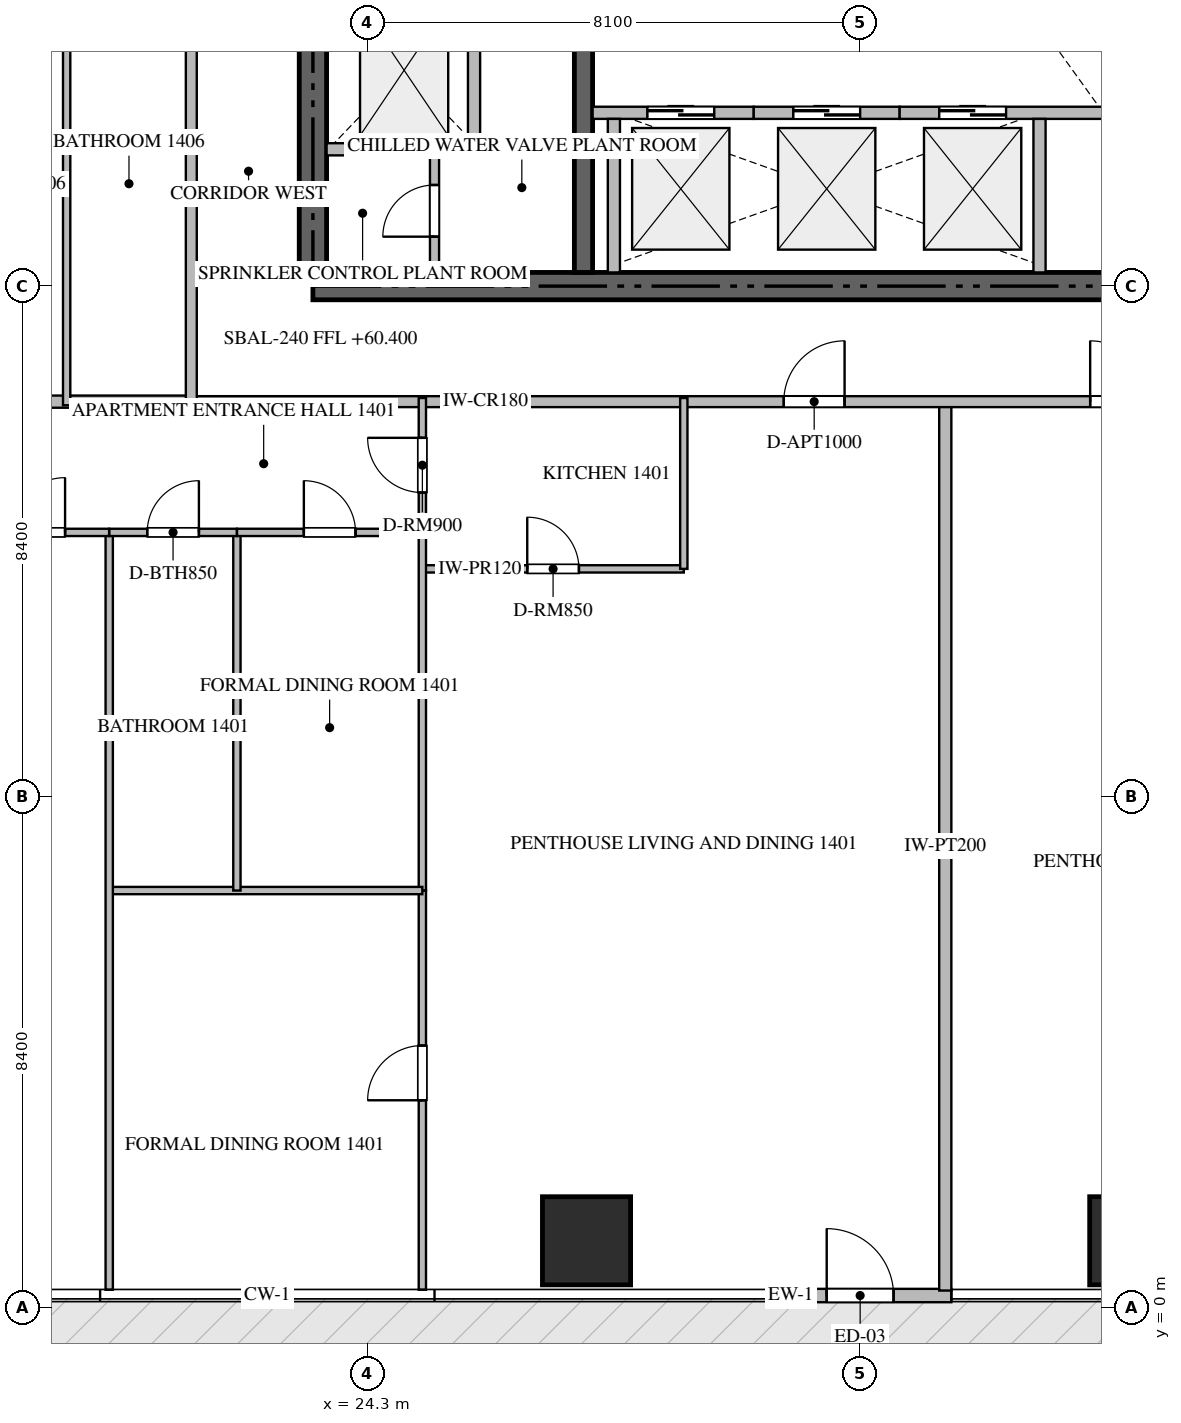
"""IFC4 building model, lengths in metres.
Left out: names, types, materials, properties, quantities, classifications, styles, units other than length and angle.
Written with IfcOpenShell. Run it as: python <this file> out.ifc"""

import sys

from ifc_helpers import new_model, si_unit, direction, frame, frame_2d, origin, origin_2d, place, context, subcontext, project, spatial, rectangle, extrude, source, transform, mapped, element, fill, save


model = new_model("IFC4")
c1 = context("Model", 3, precision=1e-05, world=origin(), true_north=direction((0.0, 1.0)))
c2 = subcontext(c1, "Body", "Model", "MODEL_VIEW")
j1 = project(units=[si_unit("LENGTHUNIT", "METRE"), si_unit("PLANEANGLEUNIT", "RADIAN")], contexts=[c1])
p1 = place(None, origin())
s1 = spatial("IfcSite", under=j1, at=p1, CompositionType="ELEMENT")
p2 = place(p1, origin())
s2 = spatial("IfcBuilding", under=s1, at=p2, CompositionType="ELEMENT")
p3 = place(p2, frame((0.0, 0.0, 60.45)))
s3 = spatial("IfcBuildingStorey", under=s2, at=p3, CompositionType="ELEMENT", Elevation=60.45)
p4 = place(p3, frame((23.4, 16.8, -0.26), z_axis=(0.0, 0.0, 1.0), x_axis=(1.0, 0.0, 0.0)))
e1 = element("IfcWall", 1, at=p4, inside=s3, PredefinedType="SHEAR", context=c2, shape_type="SweptSolid", body=[
    extrude(rectangle(XDim=18.0, YDim=0.45, at=frame_2d((9.0, 0.0))), origin(), (0.0, 0.0, 1.0), 3.748),
])
p5 = place(p3, frame((23.4, 17.025, -0.26), z_axis=(0.0, 0.0, 1.0), x_axis=(0.0, 1.0, 0.0)))
e2 = element("IfcWall", 2, at=p5, inside=s3, PredefinedType="SHEAR", context=c2, shape_type="SweptSolid", body=[
    extrude(rectangle(XDim=4.825, YDim=0.45, at=frame_2d((2.413, 0.0))), origin(), (0.0, 0.0, 1.0), 3.748),
])
p6 = place(p3, frame((27.85, 17.025, -0.26), z_axis=(0.0, 0.0, 1.0), x_axis=(0.0, 1.0, 0.0)))
e3 = element("IfcWall", 3, at=p6, inside=s3, PredefinedType="SHEAR", context=c2, shape_type="SweptSolid", body=[
    extrude(rectangle(XDim=4.825, YDim=0.3, at=frame_2d((2.413, 0.0))), origin(), (0.0, 0.0, 1.0), 3.748),
])
m1 = source(origin(), c2, "Body", "SweptSolid", [
    extrude(rectangle(XDim=1.45, YDim=1.45, at=origin_2d()), origin(), (0.0, 0.0, 1.0), 3.75),
])
for number, where, z_axis, x_axis in (
    (4, (27.9, 1.1, -0.26), (0.0, 0.0, 1.0), (1.0, 0.0, 0.0)),
    (5, (36.9, 1.1, -0.26), (0.0, 0.0, 1.0), (1.0, 0.0, 0.0)),
):
    element("IfcColumn", number, at=place(p3, frame(where, z_axis=z_axis, x_axis=x_axis)), inside=s3, PredefinedType="COLUMN", context=c2, shape_type="MappedRepresentation", body=[
        mapped(m1, transform((0.0, 0.0, 0.0), scale=1.0)),
    ])
p7 = place(p3, frame((30.9, 0.2, 0.0), z_axis=(0.0, 0.0, 1.0), x_axis=(1.0, 0.0, 0.0)))
e6 = element("IfcWall", 6, at=p7, inside=s3, PredefinedType="ELEMENTEDWALL", context=c2, shape_type="SweptSolid", body=[
    extrude(rectangle(XDim=3.0, YDim=0.22, at=frame_2d((1.5, 0.0))), origin(), (0.0, 0.0, 1.0), 3.475),
])
p8 = place(p7, frame((0.95, 0.0, 0.0)))
e7 = element("IfcOpeningElement", 7, at=p8, cuts=e6, PredefinedType="OPENING", context=c2, shape_type="SweptSolid", body=[
    extrude(rectangle(XDim=1.1, YDim=2.2, at=frame_2d((0.55, 1.1))), frame((0.0, 0.12, 0.0), z_axis=(0.0, -1.0, 0.0), x_axis=(1.0, 0.0, 0.0)), (0.0, 0.0, 1.0), 0.24),
])
p9 = place(p3, frame((28.0, 19.65, 0.0), z_axis=(0.0, 0.0, 1.0), x_axis=(1.0, 0.0, 0.0)))
e8 = element("IfcWall", 8, at=p9, inside=s3, PredefinedType="STANDARD", context=c2, shape_type="SweptSolid", body=[
    extrude(rectangle(XDim=2.65, YDim=0.2, at=frame_2d((1.325, 0.0))), origin(), (0.0, 0.0, 1.0), 3.49),
])
p10 = place(p9, frame((0.9, 0.0, 0.0)))
e9 = element("IfcOpeningElement", 9, at=p10, cuts=e8, PredefinedType="OPENING", context=c2, shape_type="SweptSolid", body=[
    extrude(rectangle(XDim=1.1, YDim=2.2, at=frame_2d((0.55, 1.1))), frame((0.0, 0.11, 0.0), z_axis=(0.0, -1.0, 0.0), x_axis=(1.0, 0.0, 0.0)), (0.0, 0.0, 1.0), 0.22),
])
p11 = place(p3, frame((28.35, 17.025, 0.0), z_axis=(0.0, 0.0, 1.0), x_axis=(0.0, 1.0, 0.0)))
e10 = element("IfcWall", 10, at=p11, inside=s3, PredefinedType="STANDARD", context=c2, shape_type="SweptSolid", body=[
    extrude(rectangle(XDim=2.525, YDim=0.2, at=frame_2d((1.263, 0.0))), origin(), (0.0, 0.0, 1.0), 3.49),
])
p12 = place(p3, frame((30.65, 19.65, 0.0), z_axis=(0.0, 0.0, 1.0), x_axis=(1.0, 0.0, 0.0)))
e11 = element("IfcWall", 11, at=p12, inside=s3, PredefinedType="STANDARD", context=c2, shape_type="SweptSolid", body=[
    extrude(rectangle(XDim=2.4, YDim=0.2, at=frame_2d((1.2, 0.0))), origin(), (0.0, 0.0, 1.0), 3.49),
])
p13 = place(p12, frame((0.65, 0.0, 0.0)))
e12 = element("IfcOpeningElement", 12, at=p13, cuts=e11, PredefinedType="OPENING", context=c2, shape_type="SweptSolid", body=[
    extrude(rectangle(XDim=1.1, YDim=2.2, at=frame_2d((0.55, 1.1))), frame((0.0, 0.11, 0.0), z_axis=(0.0, -1.0, 0.0), x_axis=(1.0, 0.0, 0.0)), (0.0, 0.0, 1.0), 0.22),
])
p14 = place(p3, frame((33.05, 19.65, 0.0), z_axis=(0.0, 0.0, 1.0), x_axis=(1.0, 0.0, 0.0)))
e13 = element("IfcWall", 13, at=p14, inside=s3, PredefinedType="STANDARD", context=c2, shape_type="SweptSolid", body=[
    extrude(rectangle(XDim=3.75, YDim=0.2, at=frame_2d((1.875, 0.0))), origin(), (0.0, 0.0, 1.0), 3.49),
])
p15 = place(p14, frame((0.65, 0.0, 0.0)))
e14 = element("IfcOpeningElement", 14, at=p15, cuts=e13, PredefinedType="OPENING", context=c2, shape_type="SweptSolid", body=[
    extrude(rectangle(XDim=1.1, YDim=2.2, at=frame_2d((0.55, 1.1))), frame((0.0, 0.11, 0.0), z_axis=(0.0, -1.0, 0.0), x_axis=(1.0, 0.0, 0.0)), (0.0, 0.0, 1.0), 0.22),
])
p16 = place(p3, frame((35.35, 17.025, 0.0), z_axis=(0.0, 0.0, 1.0), x_axis=(0.0, 1.0, 0.0)))
e15 = element("IfcWall", 15, at=p16, inside=s3, PredefinedType="STANDARD", context=c2, shape_type="SweptSolid", body=[
    extrude(rectangle(XDim=2.525, YDim=0.2, at=frame_2d((1.263, 0.0))), origin(), (0.0, 0.0, 1.0), 3.49),
])
p17 = place(p3, frame((26.05, 19.05, 0.0), z_axis=(0.0, 0.0, 1.0), x_axis=(0.0, 1.0, 0.0)))
e16 = element("IfcWall", 16, at=p17, inside=s3, PredefinedType="STANDARD", context=c2, shape_type="SweptSolid", body=[
    extrude(rectangle(XDim=2.5, YDim=0.2, at=frame_2d((1.25, 0.0))), origin(), (0.0, 0.0, 1.0), 3.49),
])
p18 = place(p3, frame((23.625, 19.05, 0.0), z_axis=(0.0, 0.0, 1.0), x_axis=(1.0, 0.0, 0.0)))
e17 = element("IfcWall", 17, at=p18, inside=s3, PredefinedType="STANDARD", context=c2, shape_type="SweptSolid", body=[
    extrude(rectangle(XDim=2.425, YDim=0.2, at=frame_2d((1.212, 0.0))), origin(), (0.0, 0.0, 1.0), 3.49),
])
p19 = place(p3, frame((25.4, 17.025, 0.0), z_axis=(0.0, 0.0, 1.0), x_axis=(0.0, 1.0, 0.0)))
e18 = element("IfcWall", 18, at=p19, inside=s3, PredefinedType="PARTITIONING", context=c2, shape_type="SweptSolid", body=[
    extrude(rectangle(XDim=2.025, YDim=0.15, at=frame_2d((1.013, 0.0))), origin(), (0.0, 0.0, 1.0), 3.49),
])
p20 = place(p19, frame((0.588, 0.0, 0.0)))
e19 = element("IfcOpeningElement", 19, at=p20, cuts=e18, PredefinedType="OPENING", context=c2, shape_type="SweptSolid", body=[
    extrude(rectangle(XDim=0.85, YDim=2.1, at=frame_2d((0.425, 1.05))), frame((0.0, 0.085, 0.0), z_axis=(0.0, -1.0, 0.0), x_axis=(1.0, 0.0, 0.0)), (0.0, 0.0, 1.0), 0.17),
])
p21 = place(p3, frame((33.8, 0.282, 0.0), z_axis=(0.0, 0.0, 1.0), x_axis=(0.0, 1.0, 0.0)))
e20 = element("IfcWall", 20, at=p21, inside=s3, PredefinedType="PARTITIONING", context=c2, shape_type="SweptSolid", body=[
    extrude(rectangle(XDim=14.618, YDim=0.2, at=frame_2d((7.309, 0.0))), origin(), (0.0, 0.0, 1.0), 3.49),
])
p22 = place(p3, frame((6.082, 14.9, 0.0), z_axis=(0.0, 0.0, 1.0), x_axis=(1.0, 0.0, 0.0)))
e21 = element("IfcWall", 21, at=p22, inside=s3, PredefinedType="PARTITIONING", context=c2, shape_type="SweptSolid", body=[
    extrude(rectangle(XDim=15.318, YDim=0.2, at=frame_2d((7.659, 0.0))), origin(), (0.0, 0.0, 1.0), 3.49),
])
p23 = place(p3, frame((21.402, 14.9, 0.0), z_axis=(0.0, 0.0, 1.0), x_axis=(1.0, 0.0, 0.0)))
e22 = element("IfcWall", 22, at=p23, inside=s3, PredefinedType="PARTITIONING", context=c2, shape_type="SweptSolid", body=[
    extrude(rectangle(XDim=21.996, YDim=0.18, at=frame_2d((10.998, 0.0))), origin(), (0.0, 0.0, 1.0), 3.49),
])
p24 = place(p23, frame((9.742, 0.0, 0.0)))
e23 = element("IfcOpeningElement", 23, at=p24, cuts=e22, PredefinedType="OPENING", context=c2, shape_type="SweptSolid", body=[
    extrude(rectangle(XDim=1.0, YDim=2.15, at=frame_2d((0.5, 1.075))), frame((0.0, 0.1, 0.0), z_axis=(0.0, -1.0, 0.0), x_axis=(1.0, 0.0, 0.0)), (0.0, 0.0, 1.0), 0.2),
])
p25 = place(p23, frame((14.781, 0.0, 0.0)))
e24 = element("IfcOpeningElement", 24, at=p25, cuts=e22, PredefinedType="OPENING", context=c2, shape_type="SweptSolid", body=[
    extrude(rectangle(XDim=1.0, YDim=2.15, at=frame_2d((0.5, 1.075))), frame((0.0, 0.1, 0.0), z_axis=(0.0, -1.0, 0.0), x_axis=(1.0, 0.0, 0.0)), (0.0, 0.0, 1.0), 0.2),
])
p26 = place(p3, frame((21.4, 14.9, 0.0), z_axis=(0.0, 0.0, 1.0), x_axis=(0.0, 1.0, 0.0)))
e25 = element("IfcWall", 25, at=p26, inside=s3, PredefinedType="PARTITIONING", context=c2, shape_type="SweptSolid", body=[
    extrude(rectangle(XDim=20.6, YDim=0.18, at=frame_2d((10.3, 0.0))), origin(), (0.0, 0.0, 1.0), 3.49),
])
p27 = place(p26, frame((8.996, 0.0, 0.0)))
e26 = element("IfcOpeningElement", 26, at=p27, cuts=e25, PredefinedType="OPENING", context=c2, shape_type="SweptSolid", body=[
    extrude(rectangle(XDim=1.0, YDim=2.15, at=frame_2d((0.5, 1.075))), frame((0.0, 0.1, 0.0), z_axis=(0.0, -1.0, 0.0), x_axis=(1.0, 0.0, 0.0)), (0.0, 0.0, 1.0), 0.2),
])
p28 = place(p26, frame((13.191, 0.0, 0.0)))
e27 = element("IfcOpeningElement", 27, at=p28, cuts=e25, PredefinedType="OPENING", context=c2, shape_type="SweptSolid", body=[
    extrude(rectangle(XDim=1.0, YDim=2.15, at=frame_2d((0.5, 1.075))), frame((0.0, 0.1, 0.0), z_axis=(0.0, -1.0, 0.0), x_axis=(1.0, 0.0, 0.0)), (0.0, 0.0, 1.0), 0.2),
])
p29 = place(p3, frame((25.2, 12.15, 0.0), z_axis=(0.0, 0.0, 1.0), x_axis=(1.0, 0.0, 0.0)))
e28 = element("IfcWall", 28, at=p29, inside=s3, PredefinedType="PARTITIONING", context=c2, shape_type="SweptSolid", body=[
    extrude(rectangle(XDim=4.3, YDim=0.12, at=frame_2d((2.15, 0.0))), origin(), (0.0, 0.0, 1.0), 3.49),
])
p30 = place(p29, frame((1.725, 0.0, 0.0)))
e29 = element("IfcOpeningElement", 29, at=p30, cuts=e28, PredefinedType="OPENING", context=c2, shape_type="SweptSolid", body=[
    extrude(rectangle(XDim=0.85, YDim=2.1, at=frame_2d((0.425, 1.05))), frame((0.0, 0.07, 0.0), z_axis=(0.0, -1.0, 0.0), x_axis=(1.0, 0.0, 0.0)), (0.0, 0.0, 1.0), 0.14),
])
p31 = place(p3, frame((29.5, 12.15, 0.0), z_axis=(0.0, 0.0, 1.0), x_axis=(0.0, 1.0, 0.0)))
e30 = element("IfcWall", 30, at=p31, inside=s3, PredefinedType="PARTITIONING", context=c2, shape_type="SweptSolid", body=[
    extrude(rectangle(XDim=2.81, YDim=0.12, at=frame_2d((1.405, 0.0))), origin(), (0.0, 0.0, 1.0), 3.49),
])
p32 = place(p3, frame((25.2, 12.75, 0.0), z_axis=(0.0, 0.0, 1.0), x_axis=(0.0, 1.0, 0.0)))
e31 = element("IfcWall", 31, at=p32, inside=s3, PredefinedType="PARTITIONING", context=c2, shape_type="SweptSolid", body=[
    extrude(rectangle(XDim=2.21, YDim=0.12, at=frame_2d((1.105, 0.0))), origin(), (0.0, 0.0, 1.0), 3.49),
])
p33 = place(p32, frame((0.655, 0.0, 0.0)))
e32 = element("IfcOpeningElement", 32, at=p33, cuts=e31, PredefinedType="OPENING", context=c2, shape_type="SweptSolid", body=[
    extrude(rectangle(XDim=0.9, YDim=2.1, at=frame_2d((0.45, 1.05))), frame((0.0, 0.07, 0.0), z_axis=(0.0, -1.0, 0.0), x_axis=(1.0, 0.0, 0.0)), (0.0, 0.0, 1.0), 0.14),
])
p34 = place(p3, frame((25.2, 0.295, 0.0), z_axis=(0.0, 0.0, 1.0), x_axis=(0.0, 1.0, 0.0)))
e33 = element("IfcWall", 33, at=p34, inside=s3, PredefinedType="PARTITIONING", context=c2, shape_type="SweptSolid", body=[
    extrude(rectangle(XDim=6.565, YDim=0.12, at=frame_2d((3.283, 0.0))), origin(), (0.0, 0.0, 1.0), 3.49),
])
p35 = place(p34, frame((3.116, 0.0, 0.0)))
e34 = element("IfcOpeningElement", 34, at=p35, cuts=e33, PredefinedType="OPENING", context=c2, shape_type="SweptSolid", body=[
    extrude(rectangle(XDim=0.9, YDim=2.1, at=frame_2d((0.45, 1.05))), frame((0.0, 0.07, 0.0), z_axis=(0.0, -1.0, 0.0), x_axis=(1.0, 0.0, 0.0)), (0.0, 0.0, 1.0), 0.14),
])
p36 = place(p3, frame((25.2, 6.862, 0.0), z_axis=(0.0, 0.0, 1.0), x_axis=(0.0, 1.0, 0.0)))
e35 = element("IfcWall", 35, at=p36, inside=s3, PredefinedType="PARTITIONING", context=c2, shape_type="SweptSolid", body=[
    extrude(rectangle(XDim=5.886, YDim=0.12, at=frame_2d((2.943, 0.0))), origin(), (0.0, 0.0, 1.0), 3.49),
])
p37 = place(p3, frame((20.05, 6.86, 0.0), z_axis=(0.0, 0.0, 1.0), x_axis=(1.0, 0.0, 0.0)))
e36 = element("IfcWall", 36, at=p37, inside=s3, PredefinedType="PARTITIONING", context=c2, shape_type="SweptSolid", body=[
    extrude(rectangle(XDim=5.15, YDim=0.12, at=frame_2d((2.575, 0.0))), origin(), (0.0, 0.0, 1.0), 3.49),
])
p38 = place(p3, frame((20.05, 0.295, 0.0), z_axis=(0.0, 0.0, 1.0), x_axis=(0.0, 1.0, 0.0)))
e37 = element("IfcWall", 37, at=p38, inside=s3, PredefinedType="PARTITIONING", context=c2, shape_type="SweptSolid", body=[
    extrude(rectangle(XDim=12.455, YDim=0.12, at=frame_2d((6.228, 0.0))), origin(), (0.0, 0.0, 1.0), 3.49),
])
p39 = place(p3, frame((22.15, 6.86, 0.0), z_axis=(0.0, 0.0, 1.0), x_axis=(0.0, 1.0, 0.0)))
e38 = element("IfcWall", 38, at=p39, inside=s3, PredefinedType="PARTITIONING", context=c2, shape_type="SweptSolid", body=[
    extrude(rectangle(XDim=5.89, YDim=0.12, at=frame_2d((2.945, 0.0))), origin(), (0.0, 0.0, 1.0), 3.49),
])
p40 = place(p3, frame((20.05, 12.75, 0.0), z_axis=(0.0, 0.0, 1.0), x_axis=(1.0, 0.0, 0.0)))
e39 = element("IfcWall", 39, at=p40, inside=s3, PredefinedType="PARTITIONING", context=c2, shape_type="SweptSolid", body=[
    extrude(rectangle(XDim=2.1, YDim=0.12, at=frame_2d((1.05, 0.0))), origin(), (0.0, 0.0, 1.0), 3.49),
])
p41 = place(p40, frame((0.625, 0.0, 0.0)))
e40 = element("IfcOpeningElement", 40, at=p41, cuts=e39, PredefinedType="OPENING", context=c2, shape_type="SweptSolid", body=[
    extrude(rectangle(XDim=0.85, YDim=2.1, at=frame_2d((0.425, 1.05))), frame((0.0, 0.07, 0.0), z_axis=(0.0, -1.0, 0.0), x_axis=(1.0, 0.0, 0.0)), (0.0, 0.0, 1.0), 0.14),
])
p42 = place(p3, frame((22.152, 12.75, 0.0), z_axis=(0.0, 0.0, 1.0), x_axis=(1.0, 0.0, 0.0)))
e41 = element("IfcWall", 41, at=p42, inside=s3, PredefinedType="PARTITIONING", context=c2, shape_type="SweptSolid", body=[
    extrude(rectangle(XDim=3.048, YDim=0.12, at=frame_2d((1.524, 0.0))), origin(), (0.0, 0.0, 1.0), 3.49),
])
p43 = place(p42, frame((1.099, 0.0, 0.0)))
e42 = element("IfcOpeningElement", 42, at=p43, cuts=e41, PredefinedType="OPENING", context=c2, shape_type="SweptSolid", body=[
    extrude(rectangle(XDim=0.85, YDim=2.1, at=frame_2d((0.425, 1.05))), frame((0.0, 0.07, 0.0), z_axis=(0.0, -1.0, 0.0), x_axis=(1.0, 0.0, 0.0)), (0.0, 0.0, 1.0), 0.14),
])
p44 = place(p3, frame((17.7, 12.75, 0.0), z_axis=(0.0, 0.0, 1.0), x_axis=(1.0, 0.0, 0.0)))
e43 = element("IfcWall", 43, at=p44, inside=s3, PredefinedType="PARTITIONING", context=c2, shape_type="SweptSolid", body=[
    extrude(rectangle(XDim=2.348, YDim=0.12, at=frame_2d((1.174, 0.0))), origin(), (0.0, 0.0, 1.0), 3.49),
])
p45 = place(p44, frame((0.724, 0.0, 0.0)))
e44 = element("IfcOpeningElement", 44, at=p45, cuts=e43, PredefinedType="OPENING", context=c2, shape_type="SweptSolid", body=[
    extrude(rectangle(XDim=0.9, YDim=2.1, at=frame_2d((0.45, 1.05))), frame((0.0, 0.07, 0.0), z_axis=(0.0, -1.0, 0.0), x_axis=(1.0, 0.0, 0.0)), (0.0, 0.0, 1.0), 0.14),
])
p46 = place(p3, frame((19.35, 14.84, 0.0), z_axis=(0.0, 0.0, 1.0), x_axis=(0.0, 1.0, 0.0)))
e45 = element("IfcWall", 45, at=p46, inside=s3, PredefinedType="PARTITIONING", context=c2, shape_type="SweptSolid", body=[
    extrude(rectangle(XDim=7.76, YDim=0.12, at=frame_2d((3.88, 0.0))), origin(), (0.0, 0.0, 1.0), 3.49),
])
m2 = source(origin(), c2, "Body", "SweptSolid", [
    extrude(rectangle(XDim=1.1, YDim=2.2, at=frame_2d((0.55, 1.1))), frame((0.0, 0.025, 0.0), z_axis=(0.0, -1.0, 0.0), x_axis=(1.0, 0.0, 0.0)), (0.0, 0.0, 1.0), 0.05),
])
p47 = place(p8, origin())
e46 = element("IfcDoor", 46, at=p47, inside=s3, OperationType="SINGLE_SWING_LEFT", PredefinedType="DOOR", context=c2, shape_type="MappedRepresentation", body=[
    mapped(m2, transform((0.0, 0.0, 0.0), scale=1.0)),
])
fill(e7, e46)
p48 = place(p10, origin())
e47 = element("IfcDoor", 47, at=p48, inside=s3, OperationType="DOUBLE_DOOR_SLIDING", PredefinedType="DOOR", context=c2, shape_type="MappedRepresentation", body=[
    mapped(m2, transform((0.0, 0.0, 0.0), scale=1.0)),
])
fill(e9, e47)
p49 = place(p13, origin())
e48 = element("IfcDoor", 48, at=p49, inside=s3, OperationType="DOUBLE_DOOR_SLIDING", PredefinedType="DOOR", context=c2, shape_type="MappedRepresentation", body=[
    mapped(m2, transform((0.0, 0.0, 0.0), scale=1.0)),
])
fill(e12, e48)
p50 = place(p15, origin())
e49 = element("IfcDoor", 49, at=p50, inside=s3, OperationType="DOUBLE_DOOR_SLIDING", PredefinedType="DOOR", context=c2, shape_type="MappedRepresentation", body=[
    mapped(m2, transform((0.0, 0.0, 0.0), scale=1.0)),
])
fill(e14, e49)
m3 = source(origin(), c2, "Body", "SweptSolid", [
    extrude(rectangle(XDim=0.85, YDim=2.1, at=frame_2d((0.425, 1.05))), frame((0.0, 0.025, 0.0), z_axis=(0.0, -1.0, 0.0), x_axis=(1.0, 0.0, 0.0)), (0.0, 0.0, 1.0), 0.05),
])
p51 = place(p20, origin())
e50 = element("IfcDoor", 50, at=p51, inside=s3, OperationType="SINGLE_SWING_LEFT", PredefinedType="DOOR", context=c2, shape_type="MappedRepresentation", body=[
    mapped(m3, transform((0.0, 0.0, 0.0), scale=1.0)),
])
fill(e19, e50)
m4 = source(origin(), c2, "Body", "SweptSolid", [
    extrude(rectangle(XDim=1.0, YDim=2.15, at=frame_2d((0.5, 1.075))), frame((0.0, 0.025, 0.0), z_axis=(0.0, -1.0, 0.0), x_axis=(1.0, 0.0, 0.0)), (0.0, 0.0, 1.0), 0.05),
])
p52 = place(p24, origin())
e51 = element("IfcDoor", 51, at=p52, inside=s3, OperationType="SINGLE_SWING_RIGHT", PredefinedType="DOOR", context=c2, shape_type="MappedRepresentation", body=[
    mapped(m4, transform((0.0, 0.0, 0.0), scale=1.0)),
])
fill(e23, e51)
p53 = place(p25, origin())
e52 = element("IfcDoor", 52, at=p53, inside=s3, OperationType="SINGLE_SWING_LEFT", PredefinedType="DOOR", context=c2, shape_type="MappedRepresentation", body=[
    mapped(m4, transform((0.0, 0.0, 0.0), scale=1.0)),
])
fill(e24, e52)
p54 = place(p30, origin())
e53 = element("IfcDoor", 53, at=p54, inside=s3, OperationType="SINGLE_SWING_LEFT", PredefinedType="DOOR", context=c2, shape_type="MappedRepresentation", body=[
    mapped(m3, transform((0.0, 0.0, 0.0), scale=1.0)),
])
fill(e29, e53)
m5 = source(origin(), c2, "Body", "SweptSolid", [
    extrude(rectangle(XDim=0.9, YDim=2.1, at=frame_2d((0.45, 1.05))), frame((0.0, 0.025, 0.0), z_axis=(0.0, -1.0, 0.0), x_axis=(1.0, 0.0, 0.0)), (0.0, 0.0, 1.0), 0.05),
])
p55 = place(p33, origin())
e54 = element("IfcDoor", 54, at=p55, inside=s3, OperationType="SINGLE_SWING_RIGHT", PredefinedType="DOOR", context=c2, shape_type="MappedRepresentation", body=[
    mapped(m5, transform((0.0, 0.0, 0.0), scale=1.0)),
])
fill(e32, e54)
p56 = place(p35, origin())
e55 = element("IfcDoor", 55, at=p56, inside=s3, OperationType="SINGLE_SWING_LEFT", PredefinedType="DOOR", context=c2, shape_type="MappedRepresentation", body=[
    mapped(m5, transform((0.0, 0.0, 0.0), scale=1.0)),
])
fill(e34, e55)
p57 = place(p41, origin())
e56 = element("IfcDoor", 56, at=p57, inside=s3, OperationType="SINGLE_SWING_RIGHT", PredefinedType="DOOR", context=c2, shape_type="MappedRepresentation", body=[
    mapped(m3, transform((0.0, 0.0, 0.0), scale=1.0)),
])
fill(e40, e56)
p58 = place(p43, origin())
e57 = element("IfcDoor", 57, at=p58, inside=s3, OperationType="SINGLE_SWING_LEFT", PredefinedType="DOOR", context=c2, shape_type="MappedRepresentation", body=[
    mapped(m3, transform((0.0, 0.0, 0.0), scale=1.0)),
])
fill(e42, e57)
p59 = place(p45, origin())
e58 = element("IfcDoor", 58, at=p59, inside=s3, OperationType="SINGLE_SWING_RIGHT", PredefinedType="DOOR", context=c2, shape_type="MappedRepresentation", body=[
    mapped(m5, transform((0.0, 0.0, 0.0), scale=1.0)),
])
fill(e44, e58)
save(model, sys.argv[1])
